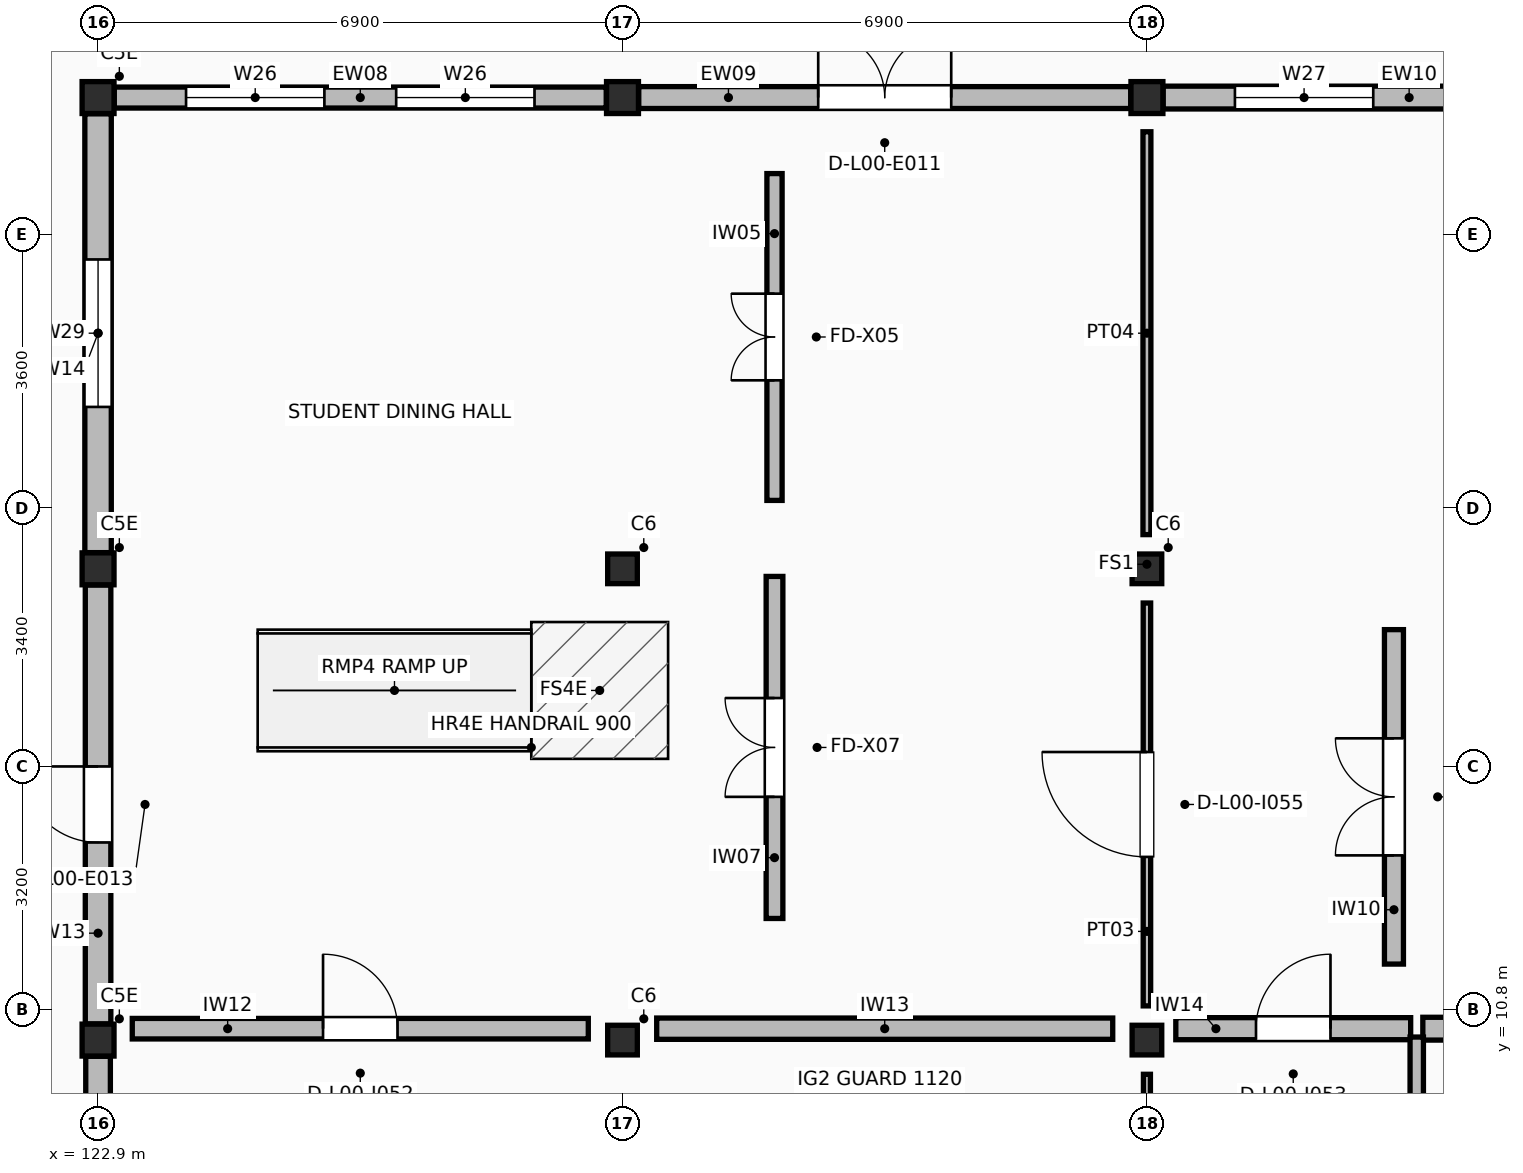
"""IFC4 building model, lengths in metres.
Left out: names, types, materials, properties, quantities, classifications, styles, units other than length and angle.
Written with IfcOpenShell. Run it as: python <this file> out.ifc"""

import sys

from ifc_helpers import new_model, si_unit, direction, frame, frame_2d, origin, origin_2d, place, context, subcontext, project, spatial, rectangle, extrude, element, fill, save


model = new_model("IFC4")
c1 = context("Model", 3, precision=1e-05, world=origin(), true_north=direction((0.0, 1.0)))
c2 = subcontext(c1, "Body", "Model", "MODEL_VIEW")
j1 = project(units=[si_unit("LENGTHUNIT", "METRE"), si_unit("PLANEANGLEUNIT", "RADIAN")], contexts=[c1])
p1 = place(None, origin())
s1 = spatial("IfcSite", under=j1, at=p1, CompositionType="ELEMENT")
p2 = place(p1, origin())
s2 = spatial("IfcBuilding", under=s1, at=p2, CompositionType="ELEMENT")
p3 = place(p2, origin())
s3 = spatial("IfcBuildingStorey", under=s2, at=p3, CompositionType="ELEMENT", Elevation=0.0)
for number, where, z_axis, x_axis in (
    (1, (122.9, 10.4, 0.0), (0.0, 0.0, 1.0), (1.0, 0.0, 0.0)),
    (2, (122.9, 16.6, 0.0), (0.0, 0.0, 1.0), (1.0, 0.0, 0.0)),
    (3, (122.9, 22.8, 0.0), (0.0, 0.0, 1.0), (1.0, 0.0, 0.0)),
):
    element("IfcColumn", number, at=place(p3, frame(where, z_axis=z_axis, x_axis=x_axis)), inside=s3, PredefinedType="COLUMN", context=c2, shape_type="SweptSolid", body=[
        extrude(rectangle(XDim=0.42, YDim=0.42, at=origin_2d()), origin(), (0.0, 0.0, 1.0), 4.42),
    ])
for number, where, z_axis, x_axis in (
    (4, (129.8, 10.4, 0.0), (0.0, 0.0, 1.0), (1.0, 0.0, 0.0)),
    (5, (129.8, 16.6, 0.0), (0.0, 0.0, 1.0), (1.0, 0.0, 0.0)),
):
    element("IfcColumn", number, at=place(p3, frame(where, z_axis=z_axis, x_axis=x_axis)), inside=s3, PredefinedType="COLUMN", context=c2, shape_type="SweptSolid", body=[
        extrude(rectangle(XDim=0.39, YDim=0.39, at=origin_2d()), origin(), (0.0, 0.0, 1.0), 4.42),
    ])
p4 = place(p3, frame((129.8, 22.8, 0.0), z_axis=(0.0, 0.0, 1.0), x_axis=(1.0, 0.0, 0.0)))
e6 = element("IfcColumn", 6, at=p4, inside=s3, PredefinedType="COLUMN", context=c2, shape_type="SweptSolid", body=[
    extrude(rectangle(XDim=0.42, YDim=0.42, at=origin_2d()), origin(), (0.0, 0.0, 1.0), 4.42),
])
for number, where, z_axis, x_axis in (
    (7, (136.7, 10.4, 0.0), (0.0, 0.0, 1.0), (1.0, 0.0, 0.0)),
    (8, (136.7, 16.6, 0.0), (0.0, 0.0, 1.0), (1.0, 0.0, 0.0)),
):
    element("IfcColumn", number, at=place(p3, frame(where, z_axis=z_axis, x_axis=x_axis)), inside=s3, PredefinedType="COLUMN", context=c2, shape_type="SweptSolid", body=[
        extrude(rectangle(XDim=0.39, YDim=0.39, at=origin_2d()), origin(), (0.0, 0.0, 1.0), 4.42),
    ])
p5 = place(p3, frame((136.7, 22.8, 0.0), z_axis=(0.0, 0.0, 1.0), x_axis=(1.0, 0.0, 0.0)))
e9 = element("IfcColumn", 9, at=p5, inside=s3, PredefinedType="COLUMN", context=c2, shape_type="SweptSolid", body=[
    extrude(rectangle(XDim=0.42, YDim=0.42, at=origin_2d()), origin(), (0.0, 0.0, 1.0), 4.42),
])
p6 = place(p3, frame((123.113, 22.8, 0.0), z_axis=(0.0, 0.0, 1.0), x_axis=(1.0, 0.0, 0.0)))
e10 = element("IfcWall", 10, at=p6, inside=s3, PredefinedType="STANDARD", context=c2, shape_type="SweptSolid", body=[
    extrude(rectangle(XDim=6.474, YDim=0.276, at=frame_2d((3.237, 0.0))), origin(), (0.0, 0.0, 1.0), 3.4),
])
p7 = place(p6, frame((0.945, 0.0, 0.95)))
e11 = element("IfcOpeningElement", 11, at=p7, cuts=e10, PredefinedType="OPENING", context=c2, shape_type="SweptSolid", body=[
    extrude(rectangle(XDim=1.82, YDim=1.3, at=frame_2d((0.91, 0.65))), frame((0.0, 0.148, 0.0), z_axis=(0.0, -1.0, 0.0), x_axis=(1.0, 0.0, 0.0)), (0.0, 0.0, 1.0), 0.296),
])
p8 = place(p6, frame((3.709, 0.0, 0.95)))
e12 = element("IfcOpeningElement", 12, at=p8, cuts=e10, PredefinedType="OPENING", context=c2, shape_type="SweptSolid", body=[
    extrude(rectangle(XDim=1.82, YDim=1.3, at=frame_2d((0.91, 0.65))), frame((0.0, 0.148, 0.0), z_axis=(0.0, -1.0, 0.0), x_axis=(1.0, 0.0, 0.0)), (0.0, 0.0, 1.0), 0.296),
])
p9 = place(p3, frame((130.013, 22.8, 0.0), z_axis=(0.0, 0.0, 1.0), x_axis=(1.0, 0.0, 0.0)))
e13 = element("IfcWall", 13, at=p9, inside=s3, PredefinedType="STANDARD", context=c2, shape_type="SweptSolid", body=[
    extrude(rectangle(XDim=6.474, YDim=0.288, at=frame_2d((3.237, 0.0))), origin(), (0.0, 0.0, 1.0), 3.4),
])
p10 = place(p9, frame((2.362, 0.0, 0.0)))
e14 = element("IfcOpeningElement", 14, at=p10, cuts=e13, PredefinedType="OPENING", context=c2, shape_type="SweptSolid", body=[
    extrude(rectangle(XDim=1.75, YDim=2.25, at=frame_2d((0.875, 1.125))), frame((0.0, 0.154, 0.0), z_axis=(0.0, -1.0, 0.0), x_axis=(1.0, 0.0, 0.0)), (0.0, 0.0, 1.0), 0.308),
])
p11 = place(p3, frame((136.913, 22.8, 0.0), z_axis=(0.0, 0.0, 1.0), x_axis=(1.0, 0.0, 0.0)))
e15 = element("IfcWall", 15, at=p11, inside=s3, PredefinedType="STANDARD", context=c2, shape_type="SweptSolid", body=[
    extrude(rectangle(XDim=6.474, YDim=0.3, at=frame_2d((3.237, 0.0))), origin(), (0.0, 0.0, 1.0), 3.4),
])
p12 = place(p11, frame((0.945, 0.0, 0.95)))
e16 = element("IfcOpeningElement", 16, at=p12, cuts=e15, PredefinedType="OPENING", context=c2, shape_type="SweptSolid", body=[
    extrude(rectangle(XDim=1.82, YDim=1.45, at=frame_2d((0.91, 0.725))), frame((0.0, 0.16, 0.0), z_axis=(0.0, -1.0, 0.0), x_axis=(1.0, 0.0, 0.0)), (0.0, 0.0, 1.0), 0.32),
])
p13 = place(p11, frame((3.709, 0.0, 0.95)))
e17 = element("IfcOpeningElement", 17, at=p13, cuts=e15, PredefinedType="OPENING", context=c2, shape_type="SweptSolid", body=[
    extrude(rectangle(XDim=1.82, YDim=1.45, at=frame_2d((0.91, 0.725))), frame((0.0, 0.16, 0.0), z_axis=(0.0, -1.0, 0.0), x_axis=(1.0, 0.0, 0.0)), (0.0, 0.0, 1.0), 0.32),
])
p14 = place(p3, frame((122.9, 4.413, 0.0), z_axis=(0.0, 0.0, 1.0), x_axis=(0.0, 1.0, 0.0)))
e18 = element("IfcWall", 18, at=p14, inside=s3, PredefinedType="STANDARD", context=c2, shape_type="SweptSolid", body=[
    extrude(rectangle(XDim=5.774, YDim=0.324, at=frame_2d((2.887, 0.0))), origin(), (0.0, 0.0, 1.0), 3.4),
])
p15 = place(p14, frame((1.977, 0.0, 0.95)))
e19 = element("IfcOpeningElement", 19, at=p15, cuts=e18, PredefinedType="OPENING", context=c2, shape_type="SweptSolid", body=[
    extrude(rectangle(XDim=1.82, YDim=1.6, at=frame_2d((0.91, 0.8))), frame((0.0, 0.172, 0.0), z_axis=(0.0, -1.0, 0.0), x_axis=(1.0, 0.0, 0.0)), (0.0, 0.0, 1.0), 0.344),
])
p16 = place(p3, frame((122.9, 10.613, 0.0), z_axis=(0.0, 0.0, 1.0), x_axis=(0.0, 1.0, 0.0)))
e20 = element("IfcWall", 20, at=p16, inside=s3, PredefinedType="STANDARD", context=c2, shape_type="SweptSolid", body=[
    extrude(rectangle(XDim=5.774, YDim=0.336, at=frame_2d((2.887, 0.0))), origin(), (0.0, 0.0, 1.0), 3.4),
])
p17 = place(p16, frame((2.387, 0.0, 0.0)))
e21 = element("IfcOpeningElement", 21, at=p17, cuts=e20, PredefinedType="OPENING", context=c2, shape_type="SweptSolid", body=[
    extrude(rectangle(XDim=1.0, YDim=2.15, at=frame_2d((0.5, 1.075))), frame((0.0, 0.178, 0.0), z_axis=(0.0, -1.0, 0.0), x_axis=(1.0, 0.0, 0.0)), (0.0, 0.0, 1.0), 0.356),
])
p18 = place(p3, frame((122.9, 16.813, 0.0), z_axis=(0.0, 0.0, 1.0), x_axis=(0.0, 1.0, 0.0)))
e22 = element("IfcWall", 22, at=p18, inside=s3, PredefinedType="STANDARD", context=c2, shape_type="SweptSolid", body=[
    extrude(rectangle(XDim=5.774, YDim=0.348, at=frame_2d((2.887, 0.0))), origin(), (0.0, 0.0, 1.0), 3.4),
])
p19 = place(p18, frame((1.917, 0.0, 0.95)))
e23 = element("IfcOpeningElement", 23, at=p19, cuts=e22, PredefinedType="OPENING", context=c2, shape_type="SweptSolid", body=[
    extrude(rectangle(XDim=1.94, YDim=1.15, at=frame_2d((0.97, 0.575))), frame((0.0, 0.184, 0.0), z_axis=(0.0, -1.0, 0.0), x_axis=(1.0, 0.0, 0.0)), (0.0, 0.0, 1.0), 0.368),
])
p20 = place(p3, frame((123.35, 10.55, 0.0), z_axis=(0.0, 0.0, 1.0), x_axis=(1.0, 0.0, 0.0)))
e24 = element("IfcWall", 24, at=p20, inside=s3, PredefinedType="STANDARD", context=c2, shape_type="SweptSolid", body=[
    extrude(rectangle(XDim=6.0, YDim=0.27, at=frame_2d((3.0, 0.0))), origin(), (0.0, 0.0, 1.0), 3.38),
])
p21 = place(p20, frame((2.51, 0.0, 0.0)))
e25 = element("IfcOpeningElement", 25, at=p21, cuts=e24, PredefinedType="OPENING", context=c2, shape_type="SweptSolid", body=[
    extrude(rectangle(XDim=0.98, YDim=2.06, at=frame_2d((0.49, 1.03))), frame((0.0, 0.145, 0.0), z_axis=(0.0, -1.0, 0.0), x_axis=(1.0, 0.0, 0.0)), (0.0, 0.0, 1.0), 0.29),
])
p22 = place(p3, frame((130.25, 10.55, 0.0), z_axis=(0.0, 0.0, 1.0), x_axis=(1.0, 0.0, 0.0)))
e26 = element("IfcWall", 26, at=p22, inside=s3, PredefinedType="STANDARD", context=c2, shape_type="SweptSolid", body=[
    extrude(rectangle(XDim=6.0, YDim=0.28, at=frame_2d((3.0, 0.0))), origin(), (0.0, 0.0, 1.0), 3.38),
])
p23 = place(p3, frame((137.08, 10.55, 0.0), z_axis=(0.0, 0.0, 1.0), x_axis=(1.0, 0.0, 0.0)))
e27 = element("IfcWall", 27, at=p23, inside=s3, PredefinedType="STANDARD", context=c2, shape_type="SweptSolid", body=[
    extrude(rectangle(XDim=3.09, YDim=0.29, at=frame_2d((1.545, 0.0))), origin(), (0.0, 0.0, 1.0), 3.38),
])
p24 = place(p23, frame((1.055, 0.0, 0.0)))
e28 = element("IfcOpeningElement", 28, at=p24, cuts=e27, PredefinedType="OPENING", context=c2, shape_type="SweptSolid", body=[
    extrude(rectangle(XDim=0.98, YDim=2.12, at=frame_2d((0.49, 1.06))), frame((0.0, 0.155, 0.0), z_axis=(0.0, -1.0, 0.0), x_axis=(1.0, 0.0, 0.0)), (0.0, 0.0, 1.0), 0.31),
])
p25 = place(p3, frame((140.33, 10.55, 0.0), z_axis=(0.0, 0.0, 1.0), x_axis=(1.0, 0.0, 0.0)))
e29 = element("IfcWall", 29, at=p25, inside=s3, PredefinedType="STANDARD", context=c2, shape_type="SweptSolid", body=[
    extrude(rectangle(XDim=2.89, YDim=0.3, at=frame_2d((1.445, 0.0))), origin(), (0.0, 0.0, 1.0), 3.38),
])
p26 = place(p3, frame((140.25, 4.44, 0.0), z_axis=(0.0, 0.0, 1.0), x_axis=(0.0, 1.0, 0.0)))
e30 = element("IfcWall", 30, at=p26, inside=s3, PredefinedType="PARTITIONING", context=c2, shape_type="SweptSolid", body=[
    extrude(rectangle(XDim=6.0, YDim=0.176, at=frame_2d((3.0, 0.0))), origin(), (0.0, 0.0, 1.0), 3.38),
])
p27 = place(p3, frame((136.7, 4.65, 0.0), z_axis=(0.0, 0.0, 1.0), x_axis=(0.0, 1.0, 0.0)))
e31 = element("IfcWall", 31, at=p27, inside=s3, PredefinedType="PARTITIONING", context=c2, shape_type="SweptSolid", body=[
    extrude(rectangle(XDim=5.3, YDim=0.092, at=frame_2d((2.65, 0.0))), origin(), (0.0, 0.0, 1.0), 3.38),
])
p28 = place(p3, frame((136.7, 10.85, 0.0), z_axis=(0.0, 0.0, 1.0), x_axis=(0.0, 1.0, 0.0)))
e32 = element("IfcWall", 32, at=p28, inside=s3, PredefinedType="PARTITIONING", context=c2, shape_type="SweptSolid", body=[
    extrude(rectangle(XDim=5.3, YDim=0.098, at=frame_2d((2.65, 0.0))), origin(), (0.0, 0.0, 1.0), 3.38),
])
p29 = place(p28, frame((1.96, 0.0, 0.0)))
e33 = element("IfcOpeningElement", 33, at=p29, cuts=e32, PredefinedType="OPENING", context=c2, shape_type="SweptSolid", body=[
    extrude(rectangle(XDim=1.38, YDim=2.24, at=frame_2d((0.69, 1.12))), frame((0.0, 0.059, 0.0), z_axis=(0.0, -1.0, 0.0), x_axis=(1.0, 0.0, 0.0)), (0.0, 0.0, 1.0), 0.118),
])
p30 = place(p3, frame((136.7, 17.05, 0.0), z_axis=(0.0, 0.0, 1.0), x_axis=(0.0, 1.0, 0.0)))
e34 = element("IfcWall", 34, at=p30, inside=s3, PredefinedType="PARTITIONING", context=c2, shape_type="SweptSolid", body=[
    extrude(rectangle(XDim=5.3, YDim=0.104, at=frame_2d((2.65, 0.0))), origin(), (0.0, 0.0, 1.0), 3.38),
])
p31 = place(p3, frame((131.8, 17.5, 0.0), z_axis=(0.0, 0.0, 1.0), x_axis=(0.0, 1.0, 0.0)))
e35 = element("IfcWall", 35, at=p31, inside=s3, PredefinedType="STANDARD", context=c2, shape_type="SweptSolid", body=[
    extrude(rectangle(XDim=4.3, YDim=0.2, at=frame_2d((2.15, 0.0))), origin(), (0.0, 0.0, 1.0), 3.38),
])
p32 = place(p31, frame((1.58, 0.0, 0.0)))
e36 = element("IfcOpeningElement", 36, at=p32, cuts=e35, PredefinedType="OPENING", context=c2, shape_type="SweptSolid", body=[
    extrude(rectangle(XDim=1.14, YDim=2.18, at=frame_2d((0.57, 1.09))), frame((0.0, 0.11, 0.0), z_axis=(0.0, -1.0, 0.0), x_axis=(1.0, 0.0, 0.0)), (0.0, 0.0, 1.0), 0.22),
])
p33 = place(p3, frame((131.8, 12.0, 0.0), z_axis=(0.0, 0.0, 1.0), x_axis=(0.0, 1.0, 0.0)))
e37 = element("IfcWall", 37, at=p33, inside=s3, PredefinedType="STANDARD", context=c2, shape_type="SweptSolid", body=[
    extrude(rectangle(XDim=4.5, YDim=0.22, at=frame_2d((2.25, 0.0))), origin(), (0.0, 0.0, 1.0), 3.38),
])
p34 = place(p33, frame((1.6, 0.0, 0.0)))
e38 = element("IfcOpeningElement", 38, at=p34, cuts=e37, PredefinedType="OPENING", context=c2, shape_type="SweptSolid", body=[
    extrude(rectangle(XDim=1.3, YDim=2.2, at=frame_2d((0.65, 1.1))), frame((0.0, 0.12, 0.0), z_axis=(0.0, -1.0, 0.0), x_axis=(1.0, 0.0, 0.0)), (0.0, 0.0, 1.0), 0.24),
])
p35 = place(p3, frame((139.95, 11.4, 0.0), z_axis=(0.0, 0.0, 1.0), x_axis=(0.0, 1.0, 0.0)))
e39 = element("IfcWall", 39, at=p35, inside=s3, PredefinedType="STANDARD", context=c2, shape_type="SweptSolid", body=[
    extrude(rectangle(XDim=4.4, YDim=0.25, at=frame_2d((2.2, 0.0))), origin(), (0.0, 0.0, 1.0), 3.38),
])
p36 = place(p35, frame((1.43, 0.0, 0.0)))
e40 = element("IfcOpeningElement", 40, at=p36, cuts=e39, PredefinedType="OPENING", context=c2, shape_type="SweptSolid", body=[
    extrude(rectangle(XDim=1.54, YDim=2.22, at=frame_2d((0.77, 1.11))), frame((0.0, 0.135, 0.0), z_axis=(0.0, -1.0, 0.0), x_axis=(1.0, 0.0, 0.0)), (0.0, 0.0, 1.0), 0.27),
])
p37 = place(p7, origin())
e41 = element("IfcWindow", 41, at=p37, inside=s3, PartitioningType="SINGLE_PANEL", PredefinedType="WINDOW", context=c2, shape_type="SweptSolid", body=[
    extrude(rectangle(XDim=1.82, YDim=1.3, at=frame_2d((0.91, 0.65))), frame((0.0, 0.03, 0.0), z_axis=(0.0, -1.0, 0.0), x_axis=(1.0, 0.0, 0.0)), (0.0, 0.0, 1.0), 0.06),
])
fill(e11, e41)
p38 = place(p8, origin())
e42 = element("IfcWindow", 42, at=p38, inside=s3, PartitioningType="SINGLE_PANEL", PredefinedType="WINDOW", context=c2, shape_type="SweptSolid", body=[
    extrude(rectangle(XDim=1.82, YDim=1.3, at=frame_2d((0.91, 0.65))), frame((0.0, 0.03, 0.0), z_axis=(0.0, -1.0, 0.0), x_axis=(1.0, 0.0, 0.0)), (0.0, 0.0, 1.0), 0.06),
])
fill(e12, e42)
p39 = place(p10, origin())
e43 = element("IfcDoor", 43, at=p39, inside=s3, OperationType="DOUBLE_DOOR_SINGLE_SWING", PredefinedType="DOOR", context=c2, shape_type="SweptSolid", body=[
    extrude(rectangle(XDim=1.75, YDim=2.25, at=frame_2d((0.875, 1.125))), frame((0.0, 0.025, 0.0), z_axis=(0.0, -1.0, 0.0), x_axis=(1.0, 0.0, 0.0)), (0.0, 0.0, 1.0), 0.05),
])
fill(e14, e43)
p40 = place(p12, origin())
e44 = element("IfcWindow", 44, at=p40, inside=s3, PartitioningType="SINGLE_PANEL", PredefinedType="WINDOW", context=c2, shape_type="SweptSolid", body=[
    extrude(rectangle(XDim=1.82, YDim=1.45, at=frame_2d((0.91, 0.725))), frame((0.0, 0.03, 0.0), z_axis=(0.0, -1.0, 0.0), x_axis=(1.0, 0.0, 0.0)), (0.0, 0.0, 1.0), 0.06),
])
fill(e16, e44)
p41 = place(p17, origin())
e45 = element("IfcDoor", 45, at=p41, inside=s3, OperationType="SINGLE_SWING_RIGHT", PredefinedType="DOOR", context=c2, shape_type="SweptSolid", body=[
    extrude(rectangle(XDim=1.0, YDim=2.15, at=frame_2d((0.5, 1.075))), frame((0.0, 0.025, 0.0), z_axis=(0.0, -1.0, 0.0), x_axis=(1.0, 0.0, 0.0)), (0.0, 0.0, 1.0), 0.05),
])
fill(e21, e45)
p42 = place(p19, origin())
e46 = element("IfcWindow", 46, at=p42, inside=s3, PartitioningType="SINGLE_PANEL", PredefinedType="WINDOW", context=c2, shape_type="SweptSolid", body=[
    extrude(rectangle(XDim=1.94, YDim=1.15, at=frame_2d((0.97, 0.575))), frame((0.0, 0.03, 0.0), z_axis=(0.0, -1.0, 0.0), x_axis=(1.0, 0.0, 0.0)), (0.0, 0.0, 1.0), 0.06),
])
fill(e23, e46)
p43 = place(p21, origin())
e47 = element("IfcDoor", 47, at=p43, inside=s3, OperationType="SINGLE_SWING_LEFT", PredefinedType="DOOR", context=c2, shape_type="SweptSolid", body=[
    extrude(rectangle(XDim=0.98, YDim=2.06, at=frame_2d((0.49, 1.03))), frame((0.0, 0.025, 0.0), z_axis=(0.0, -1.0, 0.0), x_axis=(1.0, 0.0, 0.0)), (0.0, 0.0, 1.0), 0.05),
])
fill(e25, e47)
p44 = place(p24, origin())
e48 = element("IfcDoor", 48, at=p44, inside=s3, OperationType="SINGLE_SWING_RIGHT", PredefinedType="DOOR", context=c2, shape_type="SweptSolid", body=[
    extrude(rectangle(XDim=0.98, YDim=2.12, at=frame_2d((0.49, 1.06))), frame((0.0, 0.025, 0.0), z_axis=(0.0, -1.0, 0.0), x_axis=(1.0, 0.0, 0.0)), (0.0, 0.0, 1.0), 0.05),
])
fill(e28, e48)
p45 = place(p29, frame((1.38, 0.0, 0.0), z_axis=(0.0, 0.0, 1.0), x_axis=(-1.0, 0.0, 0.0)))
e49 = element("IfcDoor", 49, at=p45, inside=s3, OperationType="SINGLE_SWING_RIGHT", PredefinedType="DOOR", context=c2, shape_type="SweptSolid", body=[
    extrude(rectangle(XDim=1.38, YDim=2.24, at=frame_2d((0.69, 1.12))), frame((0.0, 0.025, 0.0), z_axis=(0.0, -1.0, 0.0), x_axis=(1.0, 0.0, 0.0)), (0.0, 0.0, 1.0), 0.05),
])
fill(e33, e49)
p46 = place(p32, origin())
e50 = element("IfcDoor", 50, at=p46, inside=s3, OperationType="DOUBLE_DOOR_SINGLE_SWING", PredefinedType="DOOR", context=c2, shape_type="SweptSolid", body=[
    extrude(rectangle(XDim=1.14, YDim=2.18, at=frame_2d((0.57, 1.09))), frame((0.0, 0.025, 0.0), z_axis=(0.0, -1.0, 0.0), x_axis=(1.0, 0.0, 0.0)), (0.0, 0.0, 1.0), 0.05),
])
fill(e36, e50)
p47 = place(p34, origin())
e51 = element("IfcDoor", 51, at=p47, inside=s3, OperationType="DOUBLE_DOOR_SINGLE_SWING", PredefinedType="DOOR", context=c2, shape_type="SweptSolid", body=[
    extrude(rectangle(XDim=1.3, YDim=2.2, at=frame_2d((0.65, 1.1))), frame((0.0, 0.025, 0.0), z_axis=(0.0, -1.0, 0.0), x_axis=(1.0, 0.0, 0.0)), (0.0, 0.0, 1.0), 0.05),
])
fill(e38, e51)
p48 = place(p36, origin())
e52 = element("IfcDoor", 52, at=p48, inside=s3, OperationType="DOUBLE_DOOR_SINGLE_SWING", PredefinedType="DOOR", context=c2, shape_type="SweptSolid", body=[
    extrude(rectangle(XDim=1.54, YDim=2.22, at=frame_2d((0.77, 1.11))), frame((0.0, 0.025, 0.0), z_axis=(0.0, -1.0, 0.0), x_axis=(1.0, 0.0, 0.0)), (0.0, 0.0, 1.0), 0.05),
])
fill(e40, e52)
save(model, sys.argv[1])
